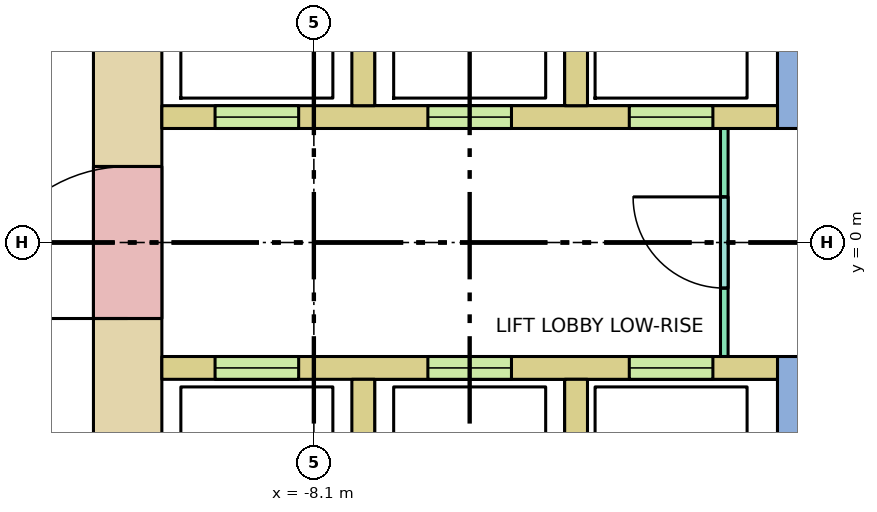
"""IFC4 building model, lengths in metres.
Left out: names, types, materials, properties, quantities, classifications, styles, units other than length and angle.
Written with IfcOpenShell. Run it as: python <this file> out.ifc"""

import sys

from ifc_helpers import new_model, si_unit, direction, frame, frame_2d, origin, place, context, subcontext, project, spatial, rectangle, extrude, element, fill, save


model = new_model("IFC4")
c1 = context("Model", 3, precision=1e-05, world=origin(), true_north=direction((0.0, 1.0)))
c2 = subcontext(c1, "Body", "Model", "MODEL_VIEW")
j1 = project(units=[si_unit("LENGTHUNIT", "METRE"), si_unit("PLANEANGLEUNIT", "RADIAN")], contexts=[c1])
p1 = place(None, origin())
s1 = spatial("IfcSite", under=j1, at=p1, CompositionType="ELEMENT")
p2 = place(p1, origin())
s2 = spatial("IfcBuilding", under=s1, at=p2, CompositionType="ELEMENT")
p3 = place(p2, frame((0.0, 0.0, 20.0)))
s3 = spatial("IfcBuildingStorey", under=s2, at=p3, CompositionType="ELEMENT", Elevation=20.0)
p4 = place(p3, frame((-10.55, -5.13, -0.32), z_axis=(0.0, 0.0, 1.0), x_axis=(0.0, 1.0, 0.0)))
e1 = element("IfcWall", 1, at=p4, inside=s3, PredefinedType="SHEAR", context=c2, shape_type="SweptSolid", body=[
    extrude(rectangle(XDim=10.26, YDim=0.9, at=frame_2d((5.13, 0.0))), origin(), (0.0, 0.0, 1.0), 7.04),
])
p5 = place(p4, frame((4.13, 0.0, 0.32)))
e2 = element("IfcOpeningElement", 2, at=p5, cuts=e1, PredefinedType="OPENING", context=c2, shape_type="SweptSolid", body=[
    extrude(rectangle(XDim=2.0, YDim=2.1, at=frame_2d((1.0, 1.05))), frame((0.0, 0.46, 0.0), z_axis=(0.0, -1.0, 0.0), x_axis=(1.0, 0.0, 0.0)), (0.0, 0.0, 1.0), 0.92),
])
p6 = place(p3, frame((-10.1, 1.65, 0.0), z_axis=(0.0, 0.0, 1.0), x_axis=(1.0, 0.0, 0.0)))
e3 = element("IfcWall", 3, at=p6, inside=s3, PredefinedType="SOLIDWALL", context=c2, shape_type="SweptSolid", body=[
    extrude(rectangle(XDim=8.1, YDim=0.3, at=frame_2d((4.05, 0.0))), origin(), (0.0, 0.0, 1.0), 6.72),
])
p7 = place(p6, frame((0.7, 0.0, 0.0)))
e4 = element("IfcOpeningElement", 4, at=p7, cuts=e3, PredefinedType="OPENING", context=c2, shape_type="SweptSolid", body=[
    extrude(rectangle(XDim=1.1, YDim=2.1, at=frame_2d((0.55, 1.05))), frame((0.0, 0.16, 0.0), z_axis=(0.0, -1.0, 0.0), x_axis=(1.0, 0.0, 0.0)), (0.0, 0.0, 1.0), 0.32),
])
p8 = place(p6, frame((3.5, 0.0, 0.0)))
e5 = element("IfcOpeningElement", 5, at=p8, cuts=e3, PredefinedType="OPENING", context=c2, shape_type="SweptSolid", body=[
    extrude(rectangle(XDim=1.1, YDim=2.1, at=frame_2d((0.55, 1.05))), frame((0.0, 0.16, 0.0), z_axis=(0.0, -1.0, 0.0), x_axis=(1.0, 0.0, 0.0)), (0.0, 0.0, 1.0), 0.32),
])
p9 = place(p6, frame((6.15, 0.0, 0.0)))
e6 = element("IfcOpeningElement", 6, at=p9, cuts=e3, PredefinedType="OPENING", context=c2, shape_type="SweptSolid", body=[
    extrude(rectangle(XDim=1.1, YDim=2.1, at=frame_2d((0.55, 1.05))), frame((0.0, 0.16, 0.0), z_axis=(0.0, -1.0, 0.0), x_axis=(1.0, 0.0, 0.0)), (0.0, 0.0, 1.0), 0.32),
])
p10 = place(p3, frame((-10.1, -1.65, 0.0), z_axis=(0.0, 0.0, 1.0), x_axis=(1.0, 0.0, 0.0)))
e7 = element("IfcWall", 7, at=p10, inside=s3, PredefinedType="SOLIDWALL", context=c2, shape_type="SweptSolid", body=[
    extrude(rectangle(XDim=8.1, YDim=0.3, at=frame_2d((4.05, 0.0))), origin(), (0.0, 0.0, 1.0), 6.72),
])
p11 = place(p10, frame((0.7, 0.0, 0.0)))
e8 = element("IfcOpeningElement", 8, at=p11, cuts=e7, PredefinedType="OPENING", context=c2, shape_type="SweptSolid", body=[
    extrude(rectangle(XDim=1.1, YDim=2.1, at=frame_2d((0.55, 1.05))), frame((0.0, 0.16, 0.0), z_axis=(0.0, -1.0, 0.0), x_axis=(1.0, 0.0, 0.0)), (0.0, 0.0, 1.0), 0.32),
])
p12 = place(p10, frame((3.5, 0.0, 0.0)))
e9 = element("IfcOpeningElement", 9, at=p12, cuts=e7, PredefinedType="OPENING", context=c2, shape_type="SweptSolid", body=[
    extrude(rectangle(XDim=1.1, YDim=2.1, at=frame_2d((0.55, 1.05))), frame((0.0, 0.16, 0.0), z_axis=(0.0, -1.0, 0.0), x_axis=(1.0, 0.0, 0.0)), (0.0, 0.0, 1.0), 0.32),
])
p13 = place(p10, frame((6.15, 0.0, 0.0)))
e10 = element("IfcOpeningElement", 10, at=p13, cuts=e7, PredefinedType="OPENING", context=c2, shape_type="SweptSolid", body=[
    extrude(rectangle(XDim=1.1, YDim=2.1, at=frame_2d((0.55, 1.05))), frame((0.0, 0.16, 0.0), z_axis=(0.0, -1.0, 0.0), x_axis=(1.0, 0.0, 0.0)), (0.0, 0.0, 1.0), 0.32),
])
for number, where, z_axis, x_axis in (
    (11, (-7.45, 1.8, 0.0), (0.0, 0.0, 1.0), (0.0, 1.0, 0.0)),
    (12, (-7.45, -4.2, 0.0), (0.0, 0.0, 1.0), (0.0, 1.0, 0.0)),
    (13, (-4.65, 1.8, 0.0), (0.0, 0.0, 1.0), (0.0, 1.0, 0.0)),
    (14, (-4.65, -4.2, 0.0), (0.0, 0.0, 1.0), (0.0, 1.0, 0.0)),
):
    element("IfcWall", number, at=place(p3, frame(where, z_axis=z_axis, x_axis=x_axis)), inside=s3, PredefinedType="SOLIDWALL", context=c2, shape_type="SweptSolid", body=[
        extrude(rectangle(XDim=2.4, YDim=0.3, at=frame_2d((1.2, 0.0))), origin(), (0.0, 0.0, 1.0), 6.72),
    ])
for number, where, z_axis, x_axis in (
    (15, (-1.85, 1.5, 0.0), (0.0, 0.0, 1.0), (0.0, 1.0, 0.0)),
    (16, (-1.85, -8.1, 0.0), (0.0, 0.0, 1.0), (0.0, 1.0, 0.0)),
):
    element("IfcWall", number, at=place(p3, frame(where, z_axis=z_axis, x_axis=x_axis)), inside=s3, PredefinedType="SHEAR", context=c2, shape_type="SweptSolid", body=[
        extrude(rectangle(XDim=6.6, YDim=0.3, at=frame_2d((3.3, 0.0))), origin(), (0.0, 0.0, 1.0), 6.72),
    ])
p14 = place(p3, frame((-2.7, -1.5, 0.0), z_axis=(0.0, 0.0, 1.0), x_axis=(0.0, 1.0, 0.0)))
e17 = element("IfcWall", 17, at=p14, inside=s3, PredefinedType="PARTITIONING", context=c2, shape_type="SweptSolid", body=[
    extrude(rectangle(XDim=3.0, YDim=0.1, at=frame_2d((1.5, 0.0))), origin(), (0.0, 0.0, 1.0), 6.72),
])
p15 = place(p14, frame((0.9, 0.0, 0.0)))
e18 = element("IfcOpeningElement", 18, at=p15, cuts=e17, PredefinedType="OPENING", context=c2, shape_type="SweptSolid", body=[
    extrude(rectangle(XDim=1.2, YDim=2.1, at=frame_2d((0.6, 1.05))), frame((0.0, 0.06, 0.0), z_axis=(0.0, -1.0, 0.0), x_axis=(1.0, 0.0, 0.0)), (0.0, 0.0, 1.0), 0.12),
])
p16 = place(p7, origin())
e19 = element("IfcDoor", 19, at=p16, inside=s3, OperationType="DOUBLE_DOOR_SLIDING", PredefinedType="DOOR", context=c2, shape_type="SweptSolid", body=[
    extrude(rectangle(XDim=1.1, YDim=2.1, at=frame_2d((0.55, 1.05))), frame((0.0, 0.025, 0.0), z_axis=(0.0, -1.0, 0.0), x_axis=(1.0, 0.0, 0.0)), (0.0, 0.0, 1.0), 0.05),
])
fill(e4, e19)
p17 = place(p8, origin())
e20 = element("IfcDoor", 20, at=p17, inside=s3, OperationType="DOUBLE_DOOR_SLIDING", PredefinedType="DOOR", context=c2, shape_type="SweptSolid", body=[
    extrude(rectangle(XDim=1.1, YDim=2.1, at=frame_2d((0.55, 1.05))), frame((0.0, 0.025, 0.0), z_axis=(0.0, -1.0, 0.0), x_axis=(1.0, 0.0, 0.0)), (0.0, 0.0, 1.0), 0.05),
])
fill(e5, e20)
p18 = place(p9, origin())
e21 = element("IfcDoor", 21, at=p18, inside=s3, OperationType="DOUBLE_DOOR_SLIDING", PredefinedType="DOOR", context=c2, shape_type="SweptSolid", body=[
    extrude(rectangle(XDim=1.1, YDim=2.1, at=frame_2d((0.55, 1.05))), frame((0.0, 0.025, 0.0), z_axis=(0.0, -1.0, 0.0), x_axis=(1.0, 0.0, 0.0)), (0.0, 0.0, 1.0), 0.05),
])
fill(e6, e21)
p19 = place(p11, origin())
e22 = element("IfcDoor", 22, at=p19, inside=s3, OperationType="DOUBLE_DOOR_SLIDING", PredefinedType="DOOR", context=c2, shape_type="SweptSolid", body=[
    extrude(rectangle(XDim=1.1, YDim=2.1, at=frame_2d((0.55, 1.05))), frame((0.0, 0.025, 0.0), z_axis=(0.0, -1.0, 0.0), x_axis=(1.0, 0.0, 0.0)), (0.0, 0.0, 1.0), 0.05),
])
fill(e8, e22)
p20 = place(p12, origin())
e23 = element("IfcDoor", 23, at=p20, inside=s3, OperationType="DOUBLE_DOOR_SLIDING", PredefinedType="DOOR", context=c2, shape_type="SweptSolid", body=[
    extrude(rectangle(XDim=1.1, YDim=2.1, at=frame_2d((0.55, 1.05))), frame((0.0, 0.025, 0.0), z_axis=(0.0, -1.0, 0.0), x_axis=(1.0, 0.0, 0.0)), (0.0, 0.0, 1.0), 0.05),
])
fill(e9, e23)
p21 = place(p13, origin())
e24 = element("IfcDoor", 24, at=p21, inside=s3, OperationType="DOUBLE_DOOR_SLIDING", PredefinedType="DOOR", context=c2, shape_type="SweptSolid", body=[
    extrude(rectangle(XDim=1.1, YDim=2.1, at=frame_2d((0.55, 1.05))), frame((0.0, 0.025, 0.0), z_axis=(0.0, -1.0, 0.0), x_axis=(1.0, 0.0, 0.0)), (0.0, 0.0, 1.0), 0.05),
])
fill(e10, e24)
p22 = place(p5, origin())
e25 = element("IfcDoor", 25, at=p22, inside=s3, OperationType="DOUBLE_DOOR_SINGLE_SWING", PredefinedType="DOOR", context=c2, shape_type="SweptSolid", body=[
    extrude(rectangle(XDim=2.0, YDim=2.1, at=frame_2d((1.0, 1.05))), frame((0.0, 0.025, 0.0), z_axis=(0.0, -1.0, 0.0), x_axis=(1.0, 0.0, 0.0)), (0.0, 0.0, 1.0), 0.05),
])
fill(e2, e25)
p23 = place(p15, origin())
e26 = element("IfcDoor", 26, at=p23, inside=s3, OperationType="SINGLE_SWING_RIGHT", PredefinedType="DOOR", context=c2, shape_type="SweptSolid", body=[
    extrude(rectangle(XDim=1.2, YDim=2.1, at=frame_2d((0.6, 1.05))), frame((0.0, 0.025, 0.0), z_axis=(0.0, -1.0, 0.0), x_axis=(1.0, 0.0, 0.0)), (0.0, 0.0, 1.0), 0.05),
])
fill(e18, e26)
save(model, sys.argv[1])
